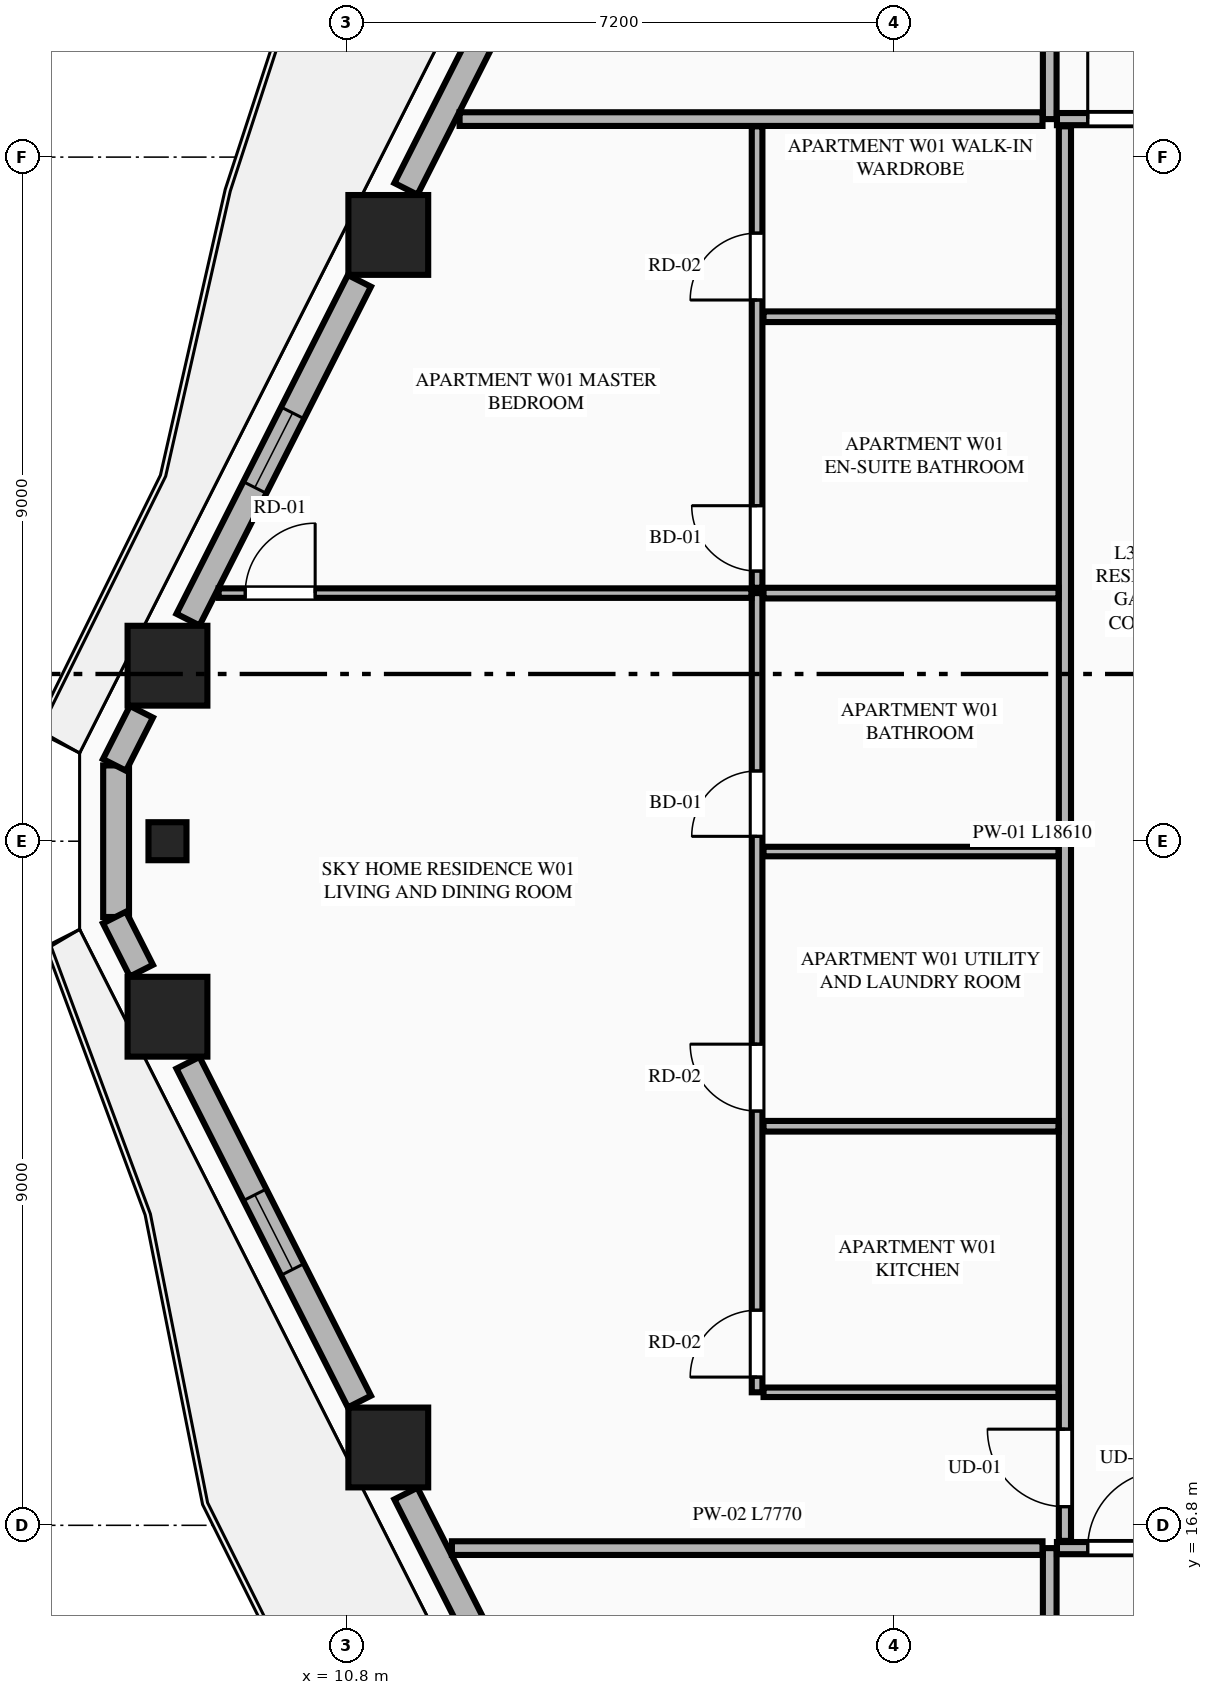
"""IFC4 building model, lengths in metres.
Left out: names, types, materials, properties, quantities, classifications, styles, units other than length and angle.
Written with IfcOpenShell. Run it as: python <this file> out.ifc"""

import sys

from ifc_helpers import new_model, si_unit, direction, frame, frame_2d, origin, origin_2d, place, context, subcontext, project, spatial, rectangle, extrude, element, fill, save


model = new_model("IFC4")
c1 = context("Model", 3, precision=1e-05, world=origin(), true_north=direction((0.0, 1.0)))
c2 = subcontext(c1, "Body", "Model", "MODEL_VIEW")
j1 = project(units=[si_unit("LENGTHUNIT", "METRE"), si_unit("PLANEANGLEUNIT", "RADIAN")], contexts=[c1])
p1 = place(None, origin())
s1 = spatial("IfcSite", under=j1, at=p1, CompositionType="ELEMENT")
p2 = place(p1, origin())
s2 = spatial("IfcBuilding", under=s1, at=p2, CompositionType="ELEMENT")
p3 = place(p2, frame((0.0, 0.0, 126.8)))
s3 = spatial("IfcBuildingStorey", under=s2, at=p3, CompositionType="ELEMENT", Elevation=126.8)
for number, where, z_axis, x_axis in (
    (1, (11.348, 33.776, 0.0), (0.0, 0.0, 1.0), (1.0, 0.0, 0.0)),
    (2, (8.443, 28.109, 0.0), (0.0, 0.0, 1.0), (1.0, 0.0, 0.0)),
    (3, (8.443, 23.491, 0.0), (0.0, 0.0, 1.0), (1.0, 0.0, 0.0)),
    (4, (11.348, 17.824, 0.0), (0.0, 0.0, 1.0), (1.0, 0.0, 0.0)),
):
    element("IfcColumn", number, at=place(p3, frame(where, z_axis=z_axis, x_axis=x_axis)), inside=s3, PredefinedType="COLUMN", context=c2, shape_type="SweptSolid", body=[
        extrude(rectangle(XDim=1.05, YDim=1.05, at=origin_2d()), origin(), (0.0, 0.0, 1.0), 3.55),
    ])
p4 = place(p3, frame((8.443, 25.8, 0.0), z_axis=(0.0, 0.0, 1.0), x_axis=(0.0, -1.0, 0.0)))
e5 = element("IfcColumn", 5, at=p4, inside=s3, PredefinedType="PILASTER", context=c2, shape_type="SweptSolid", body=[
    extrude(rectangle(XDim=0.5, YDim=0.35, at=origin_2d()), origin(), (0.0, 0.0, 1.0), 3.55),
])
p5 = place(p3, frame((7.767, 26.797, 0.0), z_axis=(0.0, 0.0, 1.0), x_axis=(0.0, -1.0, 0.0)))
e6 = element("IfcWall", 6, at=p5, inside=s3, PredefinedType="STANDARD", context=c2, shape_type="SweptSolid", body=[
    extrude(rectangle(XDim=1.994, YDim=0.34, at=frame_2d((0.997, 0.0))), origin(), (0.0, 0.0, 1.0), 3.34),
])
p6 = place(p3, frame((13.937, 39.039, 0.0), z_axis=(0.0, 0.0, 1.0), x_axis=(-0.451567731634, -0.892236842855, 0.0)))
e7 = element("IfcWall", 7, at=p6, inside=s3, PredefinedType="STANDARD", context=c2, shape_type="SweptSolid", body=[
    extrude(rectangle(XDim=5.219, YDim=0.34, at=frame_2d((2.61, 0.0))), origin(), (0.0, 0.0, 1.0), 2.797),
])
p7 = place(p6, frame((1.42, 0.0, 0.0)))
e8 = element("IfcOpeningElement", 8, at=p7, cuts=e7, PredefinedType="OPENING", context=c2, shape_type="SweptSolid", body=[
    extrude(rectangle(XDim=1.1, YDim=2.25, at=frame_2d((0.55, 1.125))), frame((0.0, 0.18, 0.0), z_axis=(0.0, -1.0, 0.0), x_axis=(1.0, 0.0, 0.0)), (0.0, 0.0, 1.0), 0.36),
])
p8 = place(p3, frame((10.968, 33.172, 0.0), z_axis=(0.0, 0.0, 1.0), x_axis=(-0.451470533039, -0.892286029139, 0.0)))
e9 = element("IfcWall", 9, at=p8, inside=s3, PredefinedType="STANDARD", context=c2, shape_type="SweptSolid", body=[
    extrude(rectangle(XDim=4.995, YDim=0.34, at=frame_2d((2.498, 0.0))), origin(), (0.0, 0.0, 1.0), 2.797),
])
p9 = place(p8, frame((1.947, 0.0, 0.75)))
e10 = element("IfcOpeningElement", 10, at=p9, cuts=e9, PredefinedType="OPENING", context=c2, shape_type="SweptSolid", body=[
    extrude(rectangle(XDim=1.1, YDim=1.897, at=frame_2d((0.55, 0.948))), frame((0.0, 0.18, 0.0), z_axis=(0.0, -1.0, 0.0), x_axis=(1.0, 0.0, 0.0)), (0.0, 0.0, 1.0), 0.36),
])
for number, where, z_axis, x_axis in (
    (11, (8.1, 27.503, 0.0), (0.0, 0.0, 1.0), (-0.452, -0.892, 0.0)),
    (12, (7.746, 24.796, 0.0), (0.0, 0.0, 1.0), (0.452, -0.892, 0.0)),
):
    element("IfcWall", number, at=place(p3, frame(where, z_axis=z_axis, x_axis=x_axis)), inside=s3, PredefinedType="STANDARD", context=c2, shape_type="SweptSolid", body=[
        extrude(rectangle(XDim=0.783, YDim=0.34, at=frame_2d((0.392, 0.0))), origin(), (0.0, 0.0, 1.0), 3.34),
    ])
p10 = place(p3, frame((8.713, 22.885, 0.0), z_axis=(0.0, 0.0, 1.0), x_axis=(0.451470533039, -0.892286029139, 0.0)))
e13 = element("IfcWall", 13, at=p10, inside=s3, PredefinedType="STANDARD", context=c2, shape_type="SweptSolid", body=[
    extrude(rectangle(XDim=4.995, YDim=0.34, at=frame_2d((2.498, 0.0))), origin(), (0.0, 0.0, 1.0), 2.797),
])
p11 = place(p10, frame((1.947, 0.0, 0.75)))
e14 = element("IfcOpeningElement", 14, at=p11, cuts=e13, PredefinedType="OPENING", context=c2, shape_type="SweptSolid", body=[
    extrude(rectangle(XDim=1.1, YDim=1.897, at=frame_2d((0.55, 0.948))), frame((0.0, 0.18, 0.0), z_axis=(0.0, -1.0, 0.0), x_axis=(1.0, 0.0, 0.0)), (0.0, 0.0, 1.0), 0.36),
])
p12 = place(p3, frame((11.58, 17.218, 0.0), z_axis=(0.0, 0.0, 1.0), x_axis=(0.451567731634, -0.892236842855, 0.0)))
e15 = element("IfcWall", 15, at=p12, inside=s3, PredefinedType="STANDARD", context=c2, shape_type="SweptSolid", body=[
    extrude(rectangle(XDim=5.219, YDim=0.34, at=frame_2d((2.61, 0.0))), origin(), (0.0, 0.0, 1.0), 2.797),
])
p13 = place(p12, frame((2.587, 0.0, 0.0)))
e16 = element("IfcOpeningElement", 16, at=p13, cuts=e15, PredefinedType="OPENING", context=c2, shape_type="SweptSolid", body=[
    extrude(rectangle(XDim=1.1, YDim=2.25, at=frame_2d((0.55, 1.125))), frame((0.0, 0.18, 0.0), z_axis=(0.0, -1.0, 0.0), x_axis=(1.0, 0.0, 0.0)), (0.0, 0.0, 1.0), 0.36),
])
p14 = place(p3, frame((20.05, 4.105, 0.0), z_axis=(0.0, 0.0, 1.0), x_axis=(0.0, 1.0, 0.0)))
e17 = element("IfcWall", 17, at=p14, inside=s3, PredefinedType="PARTITIONING", context=c2, shape_type="SweptSolid", body=[
    extrude(rectangle(XDim=12.395, YDim=0.18, at=frame_2d((6.198, 0.0))), origin(), (0.0, 0.0, 1.0), 3.34),
])
p15 = place(p3, frame((20.145, 16.5, 0.0), z_axis=(0.0, 0.0, 1.0), x_axis=(1.0, 0.0, 0.0)))
e18 = element("IfcWall", 18, at=p15, inside=s3, PredefinedType="PARTITIONING", context=c2, shape_type="SweptSolid", body=[
    extrude(rectangle(XDim=8.328, YDim=0.16, at=frame_2d((4.164, 0.0))), origin(), (0.0, 0.0, 1.0), 3.34),
])
p16 = place(p15, frame((0.405, 0.0, 0.0)))
e19 = element("IfcOpeningElement", 19, at=p16, cuts=e18, PredefinedType="OPENING", context=c2, shape_type="SweptSolid", body=[
    extrude(rectangle(XDim=1.02, YDim=2.25, at=frame_2d((0.51, 1.125))), frame((0.0, 0.09, 0.0), z_axis=(0.0, -1.0, 0.0), x_axis=(1.0, 0.0, 0.0)), (0.0, 0.0, 1.0), 0.18),
])
p17 = place(p3, frame((20.05, 35.3, 0.0), z_axis=(0.0, 0.0, 1.0), x_axis=(0.0, 1.0, 0.0)))
e20 = element("IfcWall", 20, at=p17, inside=s3, PredefinedType="PARTITIONING", context=c2, shape_type="SweptSolid", body=[
    extrude(rectangle(XDim=12.195, YDim=0.18, at=frame_2d((6.098, 0.0))), origin(), (0.0, 0.0, 1.0), 3.34),
])
p18 = place(p3, frame((20.145, 35.3, 0.0), z_axis=(0.0, 0.0, 1.0), x_axis=(1.0, 0.0, 0.0)))
e21 = element("IfcWall", 21, at=p18, inside=s3, PredefinedType="PARTITIONING", context=c2, shape_type="SweptSolid", body=[
    extrude(rectangle(XDim=24.51, YDim=0.16, at=frame_2d((12.255, 0.0))), origin(), (0.0, 0.0, 1.0), 3.34),
])
p19 = place(p18, frame((0.405, 0.0, 0.0)))
e22 = element("IfcOpeningElement", 22, at=p19, cuts=e21, PredefinedType="OPENING", context=c2, shape_type="SweptSolid", body=[
    extrude(rectangle(XDim=1.35, YDim=2.35, at=frame_2d((0.675, 1.175))), frame((0.0, 0.09, 0.0), z_axis=(0.0, -1.0, 0.0), x_axis=(1.0, 0.0, 0.0)), (0.0, 0.0, 1.0), 0.18),
])
p20 = place(p3, frame((12.185, 16.5, 0.0), z_axis=(0.0, 0.0, 1.0), x_axis=(1.0, 0.0, 0.0)))
e23 = element("IfcWall", 23, at=p20, inside=s3, PredefinedType="PARTITIONING", context=c2, shape_type="SweptSolid", body=[
    extrude(rectangle(XDim=7.77, YDim=0.18, at=frame_2d((3.885, 0.0))), origin(), (0.0, 0.0, 1.0), 3.34),
])
p21 = place(p3, frame((12.286, 35.3, 0.0), z_axis=(0.0, 0.0, 1.0), x_axis=(1.0, 0.0, 0.0)))
e24 = element("IfcWall", 24, at=p21, inside=s3, PredefinedType="PARTITIONING", context=c2, shape_type="SweptSolid", body=[
    extrude(rectangle(XDim=7.669, YDim=0.18, at=frame_2d((3.834, 0.0))), origin(), (0.0, 0.0, 1.0), 3.34),
])
p22 = place(p3, frame((20.25, 16.595, 0.0), z_axis=(0.0, 0.0, 1.0), x_axis=(0.0, 1.0, 0.0)))
e25 = element("IfcWall", 25, at=p22, inside=s3, PredefinedType="PARTITIONING", context=c2, shape_type="SweptSolid", body=[
    extrude(rectangle(XDim=18.61, YDim=0.16, at=frame_2d((9.305, 0.0))), origin(), (0.0, 0.0, 1.0), 3.34),
])
p23 = place(p22, frame((0.45, 0.0, 0.0)))
e26 = element("IfcOpeningElement", 26, at=p23, cuts=e25, PredefinedType="OPENING", context=c2, shape_type="SweptSolid", body=[
    extrude(rectangle(XDim=1.02, YDim=2.25, at=frame_2d((0.51, 1.125))), frame((0.0, 0.09, 0.0), z_axis=(0.0, -1.0, 0.0), x_axis=(1.0, 0.0, 0.0)), (0.0, 0.0, 1.0), 0.18),
])
p24 = place(p3, frame((16.285, 18.55, 0.0), z_axis=(0.0, 0.0, 1.0), x_axis=(1.0, 0.0, 0.0)))
e27 = element("IfcWall", 27, at=p24, inside=s3, PredefinedType="PARTITIONING", context=c2, shape_type="SweptSolid", body=[
    extrude(rectangle(XDim=3.88, YDim=0.125, at=frame_2d((1.94, 0.0))), origin(), (0.0, 0.0, 1.0), 2.722),
])
p25 = place(p3, frame((16.2, 18.55, 0.0), z_axis=(0.0, 0.0, 1.0), x_axis=(0.0, 1.0, 0.0)))
e28 = element("IfcWall", 28, at=p25, inside=s3, PredefinedType="PLUMBINGWALL", context=c2, shape_type="SweptSolid", body=[
    extrude(rectangle(XDim=10.514, YDim=0.14, at=frame_2d((5.257, 0.0))), origin(), (0.0, 0.0, 1.0), 3.34),
])
p26 = place(p25, frame((0.2, 0.0, 0.0)))
e29 = element("IfcOpeningElement", 29, at=p26, cuts=e28, PredefinedType="OPENING", context=c2, shape_type="SweptSolid", body=[
    extrude(rectangle(XDim=0.88, YDim=2.15, at=frame_2d((0.44, 1.075))), frame((0.0, 0.08, 0.0), z_axis=(0.0, -1.0, 0.0), x_axis=(1.0, 0.0, 0.0)), (0.0, 0.0, 1.0), 0.16),
])
p27 = place(p25, frame((3.7, 0.0, 0.0)))
e30 = element("IfcOpeningElement", 30, at=p27, cuts=e28, PredefinedType="OPENING", context=c2, shape_type="SweptSolid", body=[
    extrude(rectangle(XDim=0.88, YDim=2.15, at=frame_2d((0.44, 1.075))), frame((0.0, 0.08, 0.0), z_axis=(0.0, -1.0, 0.0), x_axis=(1.0, 0.0, 0.0)), (0.0, 0.0, 1.0), 0.16),
])
p28 = place(p25, frame((7.314, 0.0, 0.0)))
e31 = element("IfcOpeningElement", 31, at=p28, cuts=e28, PredefinedType="OPENING", context=c2, shape_type="SweptSolid", body=[
    extrude(rectangle(XDim=0.86, YDim=2.1, at=frame_2d((0.43, 1.05))), frame((0.0, 0.08, 0.0), z_axis=(0.0, -1.0, 0.0), x_axis=(1.0, 0.0, 0.0)), (0.0, 0.0, 1.0), 0.16),
])
p29 = place(p3, frame((16.2, 29.134, 0.0), z_axis=(0.0, 0.0, 1.0), x_axis=(0.0, 1.0, 0.0)))
e32 = element("IfcWall", 32, at=p29, inside=s3, PredefinedType="PLUMBINGWALL", context=c2, shape_type="SweptSolid", body=[
    extrude(rectangle(XDim=6.071, YDim=0.14, at=frame_2d((3.036, 0.0))), origin(), (0.0, 0.0, 1.0), 3.34),
])
p30 = place(p29, frame((0.22, 0.0, 0.0)))
e33 = element("IfcOpeningElement", 33, at=p30, cuts=e32, PredefinedType="OPENING", context=c2, shape_type="SweptSolid", body=[
    extrude(rectangle(XDim=0.86, YDim=2.1, at=frame_2d((0.43, 1.05))), frame((0.0, 0.08, 0.0), z_axis=(0.0, -1.0, 0.0), x_axis=(1.0, 0.0, 0.0)), (0.0, 0.0, 1.0), 0.16),
])
p31 = place(p29, frame((3.786, 0.0, 0.0)))
e34 = element("IfcOpeningElement", 34, at=p31, cuts=e32, PredefinedType="OPENING", context=c2, shape_type="SweptSolid", body=[
    extrude(rectangle(XDim=0.88, YDim=2.15, at=frame_2d((0.44, 1.075))), frame((0.0, 0.08, 0.0), z_axis=(0.0, -1.0, 0.0), x_axis=(1.0, 0.0, 0.0)), (0.0, 0.0, 1.0), 0.16),
])
p32 = place(p3, frame((16.285, 29.064, 0.0), z_axis=(0.0, 0.0, 1.0), x_axis=(1.0, 0.0, 0.0)))
e35 = element("IfcWall", 35, at=p32, inside=s3, PredefinedType="PLUMBINGWALL", context=c2, shape_type="SweptSolid", body=[
    extrude(rectangle(XDim=3.88, YDim=0.14, at=frame_2d((1.94, 0.0))), origin(), (0.0, 0.0, 1.0), 3.34),
])
p33 = place(p3, frame((9.116, 29.064, 0.0), z_axis=(0.0, 0.0, 1.0), x_axis=(1.0, 0.0, 0.0)))
e36 = element("IfcWall", 36, at=p33, inside=s3, PredefinedType="PARTITIONING", context=c2, shape_type="SweptSolid", body=[
    extrude(rectangle(XDim=7.009, YDim=0.125, at=frame_2d((3.504, 0.0))), origin(), (0.0, 0.0, 1.0), 3.34),
])
p34 = place(p33, frame((0.35, 0.0, 0.0)))
e37 = element("IfcOpeningElement", 37, at=p34, cuts=e36, PredefinedType="OPENING", context=c2, shape_type="SweptSolid", body=[
    extrude(rectangle(XDim=0.92, YDim=2.15, at=frame_2d((0.46, 1.075))), frame((0.0, 0.073, 0.0), z_axis=(0.0, -1.0, 0.0), x_axis=(1.0, 0.0, 0.0)), (0.0, 0.0, 1.0), 0.145),
])
p35 = place(p3, frame((16.285, 22.05, 0.0), z_axis=(0.0, 0.0, 1.0), x_axis=(1.0, 0.0, 0.0)))
e38 = element("IfcWall", 38, at=p35, inside=s3, PredefinedType="PLUMBINGWALL", context=c2, shape_type="SweptSolid", body=[
    extrude(rectangle(XDim=3.88, YDim=0.14, at=frame_2d((1.94, 0.0))), origin(), (0.0, 0.0, 1.0), 3.34),
])
p36 = place(p3, frame((16.285, 25.664, 0.0), z_axis=(0.0, 0.0, 1.0), x_axis=(1.0, 0.0, 0.0)))
e39 = element("IfcWall", 39, at=p36, inside=s3, PredefinedType="PARTITIONING", context=c2, shape_type="SweptSolid", body=[
    extrude(rectangle(XDim=3.88, YDim=0.125, at=frame_2d((1.94, 0.0))), origin(), (0.0, 0.0, 1.0), 3.34),
])
p37 = place(p3, frame((16.285, 32.7, 0.0), z_axis=(0.0, 0.0, 1.0), x_axis=(1.0, 0.0, 0.0)))
e40 = element("IfcWall", 40, at=p37, inside=s3, PredefinedType="PLUMBINGWALL", context=c2, shape_type="SweptSolid", body=[
    extrude(rectangle(XDim=3.88, YDim=0.14, at=frame_2d((1.94, 0.0))), origin(), (0.0, 0.0, 1.0), 3.34),
])
p38 = place(p9, origin())
e41 = element("IfcWindow", 41, at=p38, inside=s3, PartitioningType="SINGLE_PANEL", PredefinedType="WINDOW", context=c2, shape_type="SweptSolid", body=[
    extrude(rectangle(XDim=1.1, YDim=1.897, at=frame_2d((0.55, 0.948))), frame((0.0, 0.03, 0.0), z_axis=(0.0, -1.0, 0.0), x_axis=(1.0, 0.0, 0.0)), (0.0, 0.0, 1.0), 0.06),
])
fill(e10, e41)
p39 = place(p11, origin())
e42 = element("IfcWindow", 42, at=p39, inside=s3, PartitioningType="SINGLE_PANEL", PredefinedType="WINDOW", context=c2, shape_type="SweptSolid", body=[
    extrude(rectangle(XDim=1.1, YDim=1.897, at=frame_2d((0.55, 0.948))), frame((0.0, 0.03, 0.0), z_axis=(0.0, -1.0, 0.0), x_axis=(1.0, 0.0, 0.0)), (0.0, 0.0, 1.0), 0.06),
])
fill(e14, e42)
p40 = place(p16, origin())
e43 = element("IfcDoor", 43, at=p40, inside=s3, OperationType="SINGLE_SWING_RIGHT", PredefinedType="DOOR", context=c2, shape_type="SweptSolid", body=[
    extrude(rectangle(XDim=1.02, YDim=2.25, at=frame_2d((0.51, 1.125))), frame((0.0, 0.025, 0.0), z_axis=(0.0, -1.0, 0.0), x_axis=(1.0, 0.0, 0.0)), (0.0, 0.0, 1.0), 0.05),
])
fill(e19, e43)
p41 = place(p19, origin())
e44 = element("IfcDoor", 44, at=p41, inside=s3, OperationType="SINGLE_SWING_LEFT", PredefinedType="DOOR", context=c2, shape_type="SweptSolid", body=[
    extrude(rectangle(XDim=1.35, YDim=2.35, at=frame_2d((0.675, 1.175))), frame((0.0, 0.025, 0.0), z_axis=(0.0, -1.0, 0.0), x_axis=(1.0, 0.0, 0.0)), (0.0, 0.0, 1.0), 0.05),
])
fill(e22, e44)
p42 = place(p26, origin())
e45 = element("IfcDoor", 45, at=p42, inside=s3, OperationType="SINGLE_SWING_LEFT", PredefinedType="DOOR", context=c2, shape_type="SweptSolid", body=[
    extrude(rectangle(XDim=0.88, YDim=2.15, at=frame_2d((0.44, 1.075))), frame((0.0, 0.025, 0.0), z_axis=(0.0, -1.0, 0.0), x_axis=(1.0, 0.0, 0.0)), (0.0, 0.0, 1.0), 0.05),
])
fill(e29, e45)
p43 = place(p27, origin())
e46 = element("IfcDoor", 46, at=p43, inside=s3, OperationType="SINGLE_SWING_RIGHT", PredefinedType="DOOR", context=c2, shape_type="SweptSolid", body=[
    extrude(rectangle(XDim=0.88, YDim=2.15, at=frame_2d((0.44, 1.075))), frame((0.0, 0.025, 0.0), z_axis=(0.0, -1.0, 0.0), x_axis=(1.0, 0.0, 0.0)), (0.0, 0.0, 1.0), 0.05),
])
fill(e30, e46)
p44 = place(p28, origin())
e47 = element("IfcDoor", 47, at=p44, inside=s3, OperationType="SINGLE_SWING_LEFT", PredefinedType="DOOR", context=c2, shape_type="SweptSolid", body=[
    extrude(rectangle(XDim=0.86, YDim=2.1, at=frame_2d((0.43, 1.05))), frame((0.0, 0.025, 0.0), z_axis=(0.0, -1.0, 0.0), x_axis=(1.0, 0.0, 0.0)), (0.0, 0.0, 1.0), 0.05),
])
fill(e31, e47)
p45 = place(p30, origin())
e48 = element("IfcDoor", 48, at=p45, inside=s3, OperationType="SINGLE_SWING_RIGHT", PredefinedType="DOOR", context=c2, shape_type="SweptSolid", body=[
    extrude(rectangle(XDim=0.86, YDim=2.1, at=frame_2d((0.43, 1.05))), frame((0.0, 0.025, 0.0), z_axis=(0.0, -1.0, 0.0), x_axis=(1.0, 0.0, 0.0)), (0.0, 0.0, 1.0), 0.05),
])
fill(e33, e48)
p46 = place(p31, origin())
e49 = element("IfcDoor", 49, at=p46, inside=s3, OperationType="SINGLE_SWING_LEFT", PredefinedType="DOOR", context=c2, shape_type="SweptSolid", body=[
    extrude(rectangle(XDim=0.88, YDim=2.15, at=frame_2d((0.44, 1.075))), frame((0.0, 0.025, 0.0), z_axis=(0.0, -1.0, 0.0), x_axis=(1.0, 0.0, 0.0)), (0.0, 0.0, 1.0), 0.05),
])
fill(e34, e49)
p47 = place(p23, origin())
e50 = element("IfcDoor", 50, at=p47, inside=s3, OperationType="SINGLE_SWING_RIGHT", PredefinedType="DOOR", context=c2, shape_type="SweptSolid", body=[
    extrude(rectangle(XDim=1.02, YDim=2.25, at=frame_2d((0.51, 1.125))), frame((0.0, 0.025, 0.0), z_axis=(0.0, -1.0, 0.0), x_axis=(1.0, 0.0, 0.0)), (0.0, 0.0, 1.0), 0.05),
])
fill(e26, e50)
p48 = place(p34, origin())
e51 = element("IfcDoor", 51, at=p48, inside=s3, OperationType="SINGLE_SWING_RIGHT", PredefinedType="DOOR", context=c2, shape_type="SweptSolid", body=[
    extrude(rectangle(XDim=0.92, YDim=2.15, at=frame_2d((0.46, 1.075))), frame((0.0, 0.025, 0.0), z_axis=(0.0, -1.0, 0.0), x_axis=(1.0, 0.0, 0.0)), (0.0, 0.0, 1.0), 0.05),
])
fill(e37, e51)
save(model, sys.argv[1])
